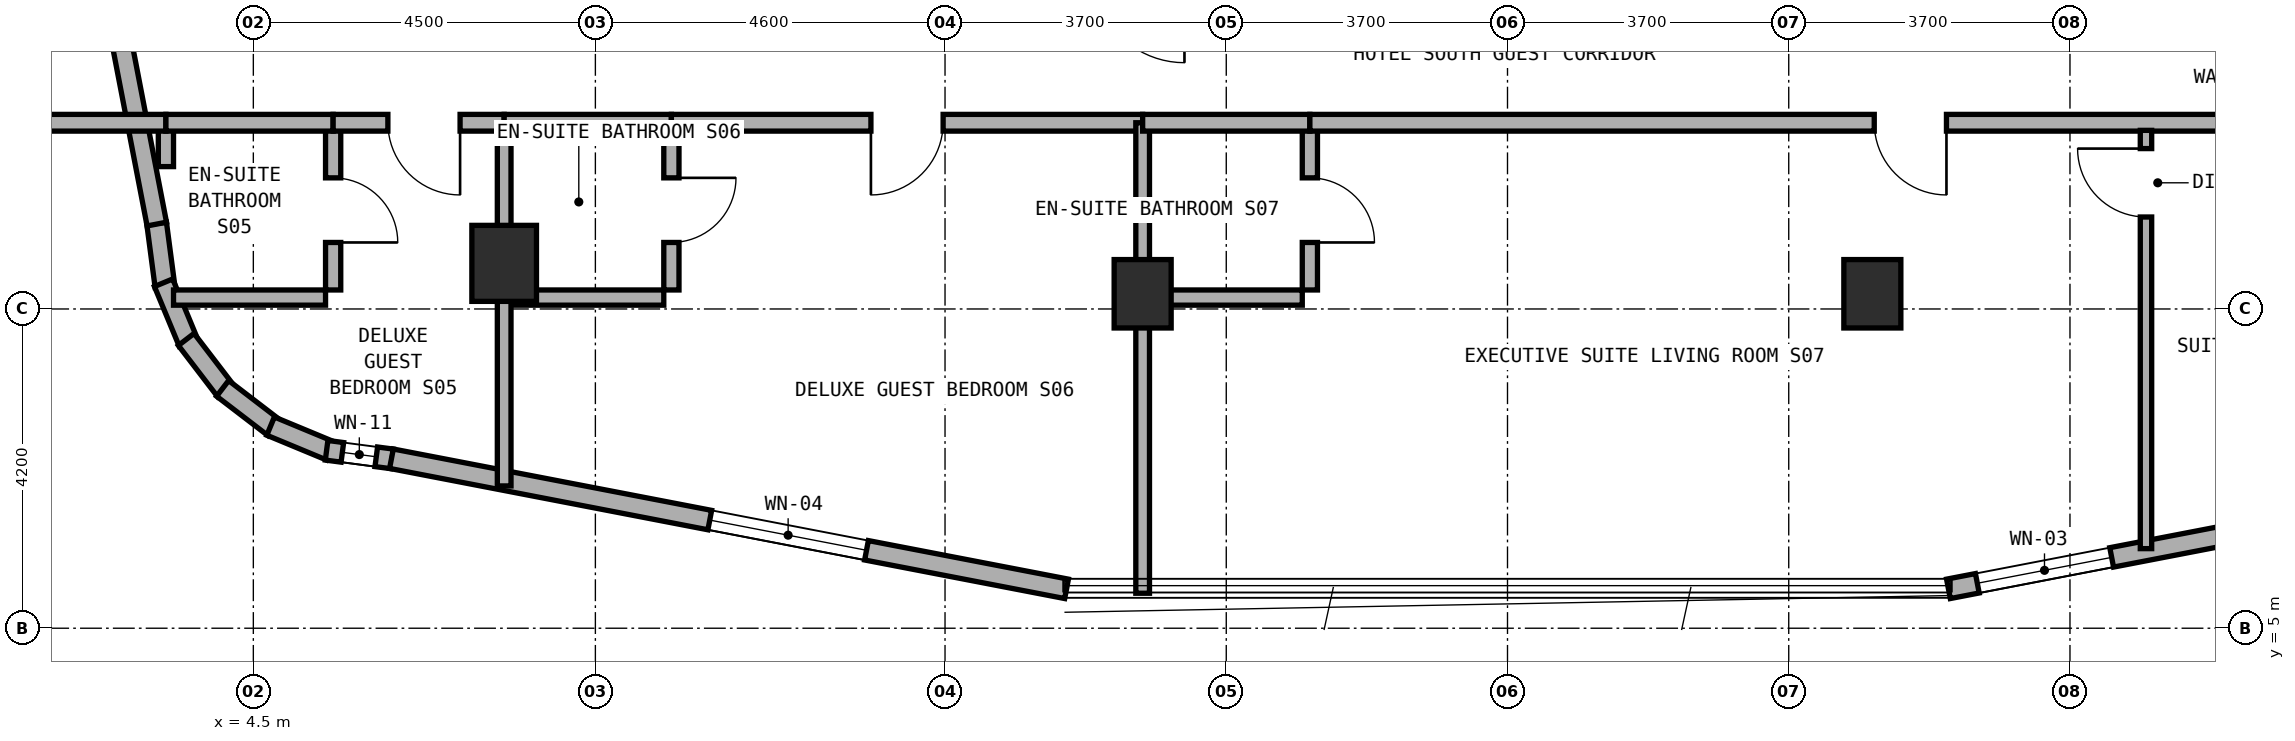
"""IFC4 building model, lengths in metres.
Left out: names, types, materials, properties, quantities, classifications, styles, units other than length and angle.
Written with IfcOpenShell. Run it as: python <this file> out.ifc"""

import sys

from ifc_helpers import new_model, si_unit, direction, frame, frame_2d, origin, origin_2d, place, context, subcontext, project, spatial, rectangle, extrude, element, fill, save


model = new_model("IFC4")
c1 = context("Model", 3, precision=1e-05, world=origin(), true_north=direction((0.0, 1.0)))
c2 = subcontext(c1, "Body", "Model", "MODEL_VIEW")
j1 = project(units=[si_unit("LENGTHUNIT", "METRE"), si_unit("PLANEANGLEUNIT", "RADIAN")], contexts=[c1])
p1 = place(None, origin())
s1 = spatial("IfcSite", under=j1, at=p1, CompositionType="ELEMENT")
p2 = place(p1, origin())
s2 = spatial("IfcBuilding", under=s1, at=p2, CompositionType="ELEMENT")
p3 = place(p2, frame((0.0, 0.0, 177.5)))
s3 = spatial("IfcBuildingStorey", under=s2, at=p3, CompositionType="ELEMENT", Elevation=177.5)
for number, where, z_axis, x_axis in (
    (1, (16.2, 9.4, 0.0), (0.0, 0.0, 1.0), (1.0, 0.0, 0.0)),
    (2, (25.8, 9.4, 0.0), (0.0, 0.0, 1.0), (1.0, 0.0, 0.0)),
):
    element("IfcColumn", number, at=place(p3, frame(where, z_axis=z_axis, x_axis=x_axis)), inside=s3, PredefinedType="COLUMN", context=c2, shape_type="SweptSolid", body=[
        extrude(rectangle(XDim=0.75, YDim=0.9, at=origin_2d()), origin(), (0.0, 0.0, 1.0), 3.6),
    ])
p4 = place(p3, frame((7.8, 9.8, 0.0), z_axis=(0.0, 0.0, 1.0), x_axis=(1.0, 0.0, 0.0)))
e3 = element("IfcColumn", 3, at=p4, inside=s3, PredefinedType="COLUMN", context=c2, shape_type="SweptSolid", body=[
    extrude(rectangle(XDim=0.85, YDim=1.0, at=origin_2d()), origin(), (0.0, 0.0, 1.0), 3.6),
])
p5 = place(p3, frame((3.228, 10.325, 0.0), z_axis=(0.0, 0.0, 1.0), x_axis=(0.130704676564, -0.99142134712, 0.0)))
e4 = element("IfcWall", 4, at=p5, inside=s3, PredefinedType="STANDARD", context=c2, shape_type="SweptSolid", body=[
    extrude(rectangle(XDim=0.833, YDim=0.26, at=frame_2d((0.417, 0.0))), origin(), (0.0, 0.0, 1.0), 3.32),
])
p6 = place(p3, frame((3.319, 9.545, 0.0), z_axis=(0.0, 0.0, 1.0), x_axis=(0.383086687796, -0.923712395518, 0.0)))
e5 = element("IfcWall", 5, at=p6, inside=s3, PredefinedType="STANDARD", context=c2, shape_type="SweptSolid", body=[
    extrude(rectangle(XDim=0.851, YDim=0.26, at=frame_2d((0.425, 0.0))), origin(), (0.0, 0.0, 1.0), 3.32),
])
for number, where, z_axis, x_axis in (
    (6, (3.617, 8.799, 0.0), (0.0, 0.0, 1.0), (0.608, -0.794, 0.0)),
    (7, (4.096, 8.155, 0.0), (0.0, 0.0, 1.0), (0.794, -0.608, 0.0)),
):
    element("IfcWall", number, at=place(p3, frame(where, z_axis=z_axis, x_axis=x_axis)), inside=s3, PredefinedType="STANDARD", context=c2, shape_type="SweptSolid", body=[
        extrude(rectangle(XDim=0.85, YDim=0.26, at=frame_2d((0.425, 0.0))), origin(), (0.0, 0.0, 1.0), 3.32),
    ])
p7 = place(p3, frame((4.727, 7.659, 0.0), z_axis=(0.0, 0.0, 1.0), x_axis=(0.923712395518, -0.383086687796, 0.0)))
e8 = element("IfcWall", 8, at=p7, inside=s3, PredefinedType="STANDARD", context=c2, shape_type="SweptSolid", body=[
    extrude(rectangle(XDim=0.851, YDim=0.26, at=frame_2d((0.425, 0.0))), origin(), (0.0, 0.0, 1.0), 3.32),
])
p8 = place(p3, frame((5.464, 7.341, 0.0), z_axis=(0.0, 0.0, 1.0), x_axis=(0.991488716273, -0.130192647656, 0.0)))
e9 = element("IfcWall", 9, at=p8, inside=s3, PredefinedType="STANDARD", context=c2, shape_type="SweptSolid", body=[
    extrude(rectangle(XDim=0.868, YDim=0.26, at=frame_2d((0.434, 0.0))), origin(), (0.0, 0.0, 1.0), 3.32),
])
p9 = place(p8, frame((0.209, 0.0, 0.85)))
e10 = element("IfcOpeningElement", 10, at=p9, cuts=e9, PredefinedType="OPENING", context=c2, shape_type="SweptSolid", body=[
    extrude(rectangle(XDim=0.45, YDim=1.5, at=frame_2d((0.225, 0.75))), frame((0.0, 0.14, 0.0), z_axis=(0.0, -1.0, 0.0), x_axis=(1.0, 0.0, 0.0)), (0.0, 0.0, 1.0), 0.28),
])
p10 = place(p3, frame((6.317, 7.23, 0.0), z_axis=(0.0, 0.0, 1.0), x_axis=(0.98192801022, -0.189254809039, 0.0)))
e11 = element("IfcWall", 11, at=p10, inside=s3, PredefinedType="STANDARD", context=c2, shape_type="SweptSolid", body=[
    extrude(rectangle(XDim=9.046, YDim=0.26, at=frame_2d((4.523, 0.0))), origin(), (0.0, 0.0, 1.0), 3.32),
])
p11 = place(p10, frame((4.265, 0.0, 0.85)))
e12 = element("IfcOpeningElement", 12, at=p11, cuts=e11, PredefinedType="OPENING", context=c2, shape_type="SweptSolid", body=[
    extrude(rectangle(XDim=2.1, YDim=1.5, at=frame_2d((1.05, 0.75))), frame((0.0, 0.14, 0.0), z_axis=(0.0, -1.0, 0.0), x_axis=(1.0, 0.0, 0.0)), (0.0, 0.0, 1.0), 0.28),
])
p12 = place(p3, frame((26.801, 5.518, 0.0), z_axis=(0.0, 0.0, 1.0), x_axis=(0.98192801022, 0.189254809039, 0.0)))
e13 = element("IfcWall", 13, at=p12, inside=s3, PredefinedType="STANDARD", context=c2, shape_type="SweptSolid", body=[
    extrude(rectangle(XDim=9.046, YDim=0.26, at=frame_2d((4.523, 0.0))), origin(), (0.0, 0.0, 1.0), 3.32),
])
p13 = place(p12, frame((0.387, 0.0, 0.85)))
e14 = element("IfcOpeningElement", 14, at=p13, cuts=e13, PredefinedType="OPENING", context=c2, shape_type="SweptSolid", body=[
    extrude(rectangle(XDim=1.8, YDim=1.5, at=frame_2d((0.9, 0.75))), frame((0.0, 0.14, 0.0), z_axis=(0.0, -1.0, 0.0), x_axis=(1.0, 0.0, 0.0)), (0.0, 0.0, 1.0), 0.28),
])
p14 = place(p12, frame((4.065, 0.0, 0.85)))
e15 = element("IfcOpeningElement", 15, at=p14, cuts=e13, PredefinedType="OPENING", context=c2, shape_type="SweptSolid", body=[
    extrude(rectangle(XDim=2.1, YDim=1.5, at=frame_2d((1.05, 0.75))), frame((0.0, 0.14, 0.0), z_axis=(0.0, -1.0, 0.0), x_axis=(1.0, 0.0, 0.0)), (0.0, 0.0, 1.0), 0.28),
])
p15 = place(p3, frame((1.518, 19.199, 0.0), z_axis=(0.0, 0.0, 1.0), x_axis=(0.189254809039, -0.98192801022, 0.0)))
e16 = element("IfcWall", 16, at=p15, inside=s3, PredefinedType="STANDARD", context=c2, shape_type="SweptSolid", body=[
    extrude(rectangle(XDim=9.046, YDim=0.26, at=frame_2d((4.523, 0.0))), origin(), (0.0, 0.0, 1.0), 3.32),
])
p16 = place(p15, frame((2.733, 0.0, 0.85)))
e17 = element("IfcOpeningElement", 17, at=p16, cuts=e16, PredefinedType="OPENING", context=c2, shape_type="SweptSolid", body=[
    extrude(rectangle(XDim=2.1, YDim=1.5, at=frame_2d((1.05, 0.75))), frame((0.0, 0.14, 0.0), z_axis=(0.0, -1.0, 0.0), x_axis=(1.0, 0.0, 0.0)), (0.0, 0.0, 1.0), 0.28),
])
p17 = place(p3, frame((5.55, 9.45, 0.0), z_axis=(0.0, 0.0, 1.0), x_axis=(0.0, 1.0, 0.0)))
e18 = element("IfcWall", 18, at=p17, inside=s3, PredefinedType="PLUMBINGWALL", context=c2, shape_type="SweptSolid", body=[
    extrude(rectangle(XDim=2.1, YDim=0.2, at=frame_2d((1.05, 0.0))), origin(), (0.0, 0.0, 1.0), 3.32),
])
p18 = place(p17, frame((0.625, 0.0, 0.0)))
e19 = element("IfcOpeningElement", 19, at=p18, cuts=e18, PredefinedType="OPENING", context=c2, shape_type="SweptSolid", body=[
    extrude(rectangle(XDim=0.85, YDim=2.1, at=frame_2d((0.425, 1.05))), frame((0.0, 0.11, 0.0), z_axis=(0.0, -1.0, 0.0), x_axis=(1.0, 0.0, 0.0)), (0.0, 0.0, 1.0), 0.22),
])
p19 = place(p3, frame((3.45, 9.35, 0.0), z_axis=(0.0, 0.0, 1.0), x_axis=(1.0, 0.0, 0.0)))
e20 = element("IfcWall", 20, at=p19, inside=s3, PredefinedType="PLUMBINGWALL", context=c2, shape_type="SweptSolid", body=[
    extrude(rectangle(XDim=2.0, YDim=0.2, at=frame_2d((1.0, 0.0))), origin(), (0.0, 0.0, 1.0), 3.32),
])
p20 = place(p3, frame((3.35, 11.073, 0.0), z_axis=(0.0, 0.0, 1.0), x_axis=(0.0, 1.0, 0.0)))
e21 = element("IfcWall", 21, at=p20, inside=s3, PredefinedType="PLUMBINGWALL", context=c2, shape_type="SweptSolid", body=[
    extrude(rectangle(XDim=0.577, YDim=0.2, at=frame_2d((0.289, 0.0))), origin(), (0.0, 0.0, 1.0), 3.32),
])
p21 = place(p3, frame((1.56, 11.65, 0.0), z_axis=(0.0, 0.0, 1.0), x_axis=(1.0, 0.0, 0.0)))
e22 = element("IfcWall", 22, at=p21, inside=s3, PredefinedType="SOLIDWALL", context=c2, shape_type="SweptSolid", body=[
    extrude(rectangle(XDim=1.79, YDim=0.22, at=frame_2d((0.895, 0.0))), origin(), (0.0, 0.0, 1.0), 3.32),
])
p22 = place(p3, frame((3.35, 11.65, 0.0), z_axis=(0.0, 0.0, 1.0), x_axis=(1.0, 0.0, 0.0)))
e23 = element("IfcWall", 23, at=p22, inside=s3, PredefinedType="SOLIDWALL", context=c2, shape_type="SweptSolid", body=[
    extrude(rectangle(XDim=2.2, YDim=0.22, at=frame_2d((1.1, 0.0))), origin(), (0.0, 0.0, 1.0), 3.32),
])
p23 = place(p3, frame((5.55, 11.65, 0.0), z_axis=(0.0, 0.0, 1.0), x_axis=(1.0, 0.0, 0.0)))
e24 = element("IfcWall", 24, at=p23, inside=s3, PredefinedType="SOLIDWALL", context=c2, shape_type="SweptSolid", body=[
    extrude(rectangle(XDim=2.25, YDim=0.22, at=frame_2d((1.125, 0.0))), origin(), (0.0, 0.0, 1.0), 2.995),
])
p24 = place(p23, frame((0.72, 0.0, 0.0)))
e25 = element("IfcOpeningElement", 25, at=p24, cuts=e24, PredefinedType="OPENING", context=c2, shape_type="SweptSolid", body=[
    extrude(rectangle(XDim=0.95, YDim=2.1, at=frame_2d((0.475, 1.05))), frame((0.0, 0.12, 0.0), z_axis=(0.0, -1.0, 0.0), x_axis=(1.0, 0.0, 0.0)), (0.0, 0.0, 1.0), 0.24),
])
p25 = place(p3, frame((7.8, 6.872, 0.0), z_axis=(0.0, 0.0, 1.0), x_axis=(0.0, 1.0, 0.0)))
e26 = element("IfcWall", 26, at=p25, inside=s3, PredefinedType="SOLIDWALL", context=c2, shape_type="SweptSolid", body=[
    extrude(rectangle(XDim=4.778, YDim=0.18, at=frame_2d((2.389, 0.0))), origin(), (0.0, 0.0, 1.0), 2.935),
])
p26 = place(p3, frame((10.0, 9.45, 0.0), z_axis=(0.0, 0.0, 1.0), x_axis=(0.0, 1.0, 0.0)))
e27 = element("IfcWall", 27, at=p26, inside=s3, PredefinedType="PLUMBINGWALL", context=c2, shape_type="SweptSolid", body=[
    extrude(rectangle(XDim=2.1, YDim=0.2, at=frame_2d((1.05, 0.0))), origin(), (0.0, 0.0, 1.0), 2.845),
])
p27 = place(p26, frame((0.625, 0.0, 0.0)))
e28 = element("IfcOpeningElement", 28, at=p27, cuts=e27, PredefinedType="OPENING", context=c2, shape_type="SweptSolid", body=[
    extrude(rectangle(XDim=0.85, YDim=2.1, at=frame_2d((0.425, 1.05))), frame((0.0, 0.11, 0.0), z_axis=(0.0, -1.0, 0.0), x_axis=(1.0, 0.0, 0.0)), (0.0, 0.0, 1.0), 0.22),
])
p28 = place(p3, frame((7.9, 9.35, 0.0), z_axis=(0.0, 0.0, 1.0), x_axis=(1.0, 0.0, 0.0)))
e29 = element("IfcWall", 29, at=p28, inside=s3, PredefinedType="PLUMBINGWALL", context=c2, shape_type="SweptSolid", body=[
    extrude(rectangle(XDim=2.0, YDim=0.2, at=frame_2d((1.0, 0.0))), origin(), (0.0, 0.0, 1.0), 3.32),
])
p29 = place(p3, frame((7.8, 11.65, 0.0), z_axis=(0.0, 0.0, 1.0), x_axis=(1.0, 0.0, 0.0)))
e30 = element("IfcWall", 30, at=p29, inside=s3, PredefinedType="SOLIDWALL", context=c2, shape_type="SweptSolid", body=[
    extrude(rectangle(XDim=2.2, YDim=0.22, at=frame_2d((1.1, 0.0))), origin(), (0.0, 0.0, 1.0), 2.995),
])
p30 = place(p3, frame((10.0, 11.65, 0.0), z_axis=(0.0, 0.0, 1.0), x_axis=(1.0, 0.0, 0.0)))
e31 = element("IfcWall", 31, at=p30, inside=s3, PredefinedType="SOLIDWALL", context=c2, shape_type="SweptSolid", body=[
    extrude(rectangle(XDim=6.2, YDim=0.22, at=frame_2d((3.1, 0.0))), origin(), (0.0, 0.0, 1.0), 2.995),
])
p31 = place(p30, frame((2.625, 0.0, 0.0)))
e32 = element("IfcOpeningElement", 32, at=p31, cuts=e31, PredefinedType="OPENING", context=c2, shape_type="SweptSolid", body=[
    extrude(rectangle(XDim=0.95, YDim=2.1, at=frame_2d((0.475, 1.05))), frame((0.0, 0.12, 0.0), z_axis=(0.0, -1.0, 0.0), x_axis=(1.0, 0.0, 0.0)), (0.0, 0.0, 1.0), 0.24),
])
p32 = place(p3, frame((16.2, 5.46, 0.0), z_axis=(0.0, 0.0, 1.0), x_axis=(0.0, 1.0, 0.0)))
e33 = element("IfcWall", 33, at=p32, inside=s3, PredefinedType="SOLIDWALL", context=c2, shape_type="SweptSolid", body=[
    extrude(rectangle(XDim=6.19, YDim=0.18, at=frame_2d((3.095, 0.0))), origin(), (0.0, 0.0, 1.0), 2.935),
])
p33 = place(p3, frame((18.4, 9.45, 0.0), z_axis=(0.0, 0.0, 1.0), x_axis=(0.0, 1.0, 0.0)))
e34 = element("IfcWall", 34, at=p33, inside=s3, PredefinedType="PLUMBINGWALL", context=c2, shape_type="SweptSolid", body=[
    extrude(rectangle(XDim=2.1, YDim=0.2, at=frame_2d((1.05, 0.0))), origin(), (0.0, 0.0, 1.0), 2.845),
])
p34 = place(p33, frame((0.625, 0.0, 0.0)))
e35 = element("IfcOpeningElement", 35, at=p34, cuts=e34, PredefinedType="OPENING", context=c2, shape_type="SweptSolid", body=[
    extrude(rectangle(XDim=0.85, YDim=2.1, at=frame_2d((0.425, 1.05))), frame((0.0, 0.11, 0.0), z_axis=(0.0, -1.0, 0.0), x_axis=(1.0, 0.0, 0.0)), (0.0, 0.0, 1.0), 0.22),
])
p35 = place(p3, frame((16.3, 9.35, 0.0), z_axis=(0.0, 0.0, 1.0), x_axis=(1.0, 0.0, 0.0)))
e36 = element("IfcWall", 36, at=p35, inside=s3, PredefinedType="PLUMBINGWALL", context=c2, shape_type="SweptSolid", body=[
    extrude(rectangle(XDim=2.0, YDim=0.2, at=frame_2d((1.0, 0.0))), origin(), (0.0, 0.0, 1.0), 2.935),
])
p36 = place(p3, frame((16.2, 11.65, 0.0), z_axis=(0.0, 0.0, 1.0), x_axis=(1.0, 0.0, 0.0)))
e37 = element("IfcWall", 37, at=p36, inside=s3, PredefinedType="SOLIDWALL", context=c2, shape_type="SweptSolid", body=[
    extrude(rectangle(XDim=2.2, YDim=0.22, at=frame_2d((1.1, 0.0))), origin(), (0.0, 0.0, 1.0), 2.995),
])
p37 = place(p3, frame((18.4, 11.65, 0.0), z_axis=(0.0, 0.0, 1.0), x_axis=(1.0, 0.0, 0.0)))
e38 = element("IfcWall", 38, at=p37, inside=s3, PredefinedType="SOLIDWALL", context=c2, shape_type="SweptSolid", body=[
    extrude(rectangle(XDim=15.8, YDim=0.22, at=frame_2d((7.9, 0.0))), origin(), (0.0, 0.0, 1.0), 2.995),
])
p38 = place(p37, frame((7.425, 0.0, 0.0)))
e39 = element("IfcOpeningElement", 39, at=p38, cuts=e38, PredefinedType="OPENING", context=c2, shape_type="SweptSolid", body=[
    extrude(rectangle(XDim=0.95, YDim=2.1, at=frame_2d((0.475, 1.05))), frame((0.0, 0.12, 0.0), z_axis=(0.0, -1.0, 0.0), x_axis=(1.0, 0.0, 0.0)), (0.0, 0.0, 1.0), 0.24),
])
p39 = place(p3, frame((29.4, 6.047, 0.0), z_axis=(0.0, 0.0, 1.0), x_axis=(0.0, 1.0, 0.0)))
e40 = element("IfcWall", 40, at=p39, inside=s3, PredefinedType="PARTITIONING", context=c2, shape_type="SweptSolid", body=[
    extrude(rectangle(XDim=5.503, YDim=0.15, at=frame_2d((2.751, 0.0))), origin(), (0.0, 0.0, 1.0), 2.845),
])
p40 = place(p39, frame((4.363, 0.0, 0.0)))
e41 = element("IfcOpeningElement", 41, at=p40, cuts=e40, PredefinedType="OPENING", context=c2, shape_type="SweptSolid", body=[
    extrude(rectangle(XDim=0.9, YDim=2.1, at=frame_2d((0.45, 1.05))), frame((0.0, 0.085, 0.0), z_axis=(0.0, -1.0, 0.0), x_axis=(1.0, 0.0, 0.0)), (0.0, 0.0, 1.0), 0.17),
])
p41 = place(p11, origin())
e42 = element("IfcWindow", 42, at=p41, inside=s3, PartitioningType="SINGLE_PANEL", PredefinedType="WINDOW", context=c2, shape_type="SweptSolid", body=[
    extrude(rectangle(XDim=2.1, YDim=1.5, at=frame_2d((1.05, 0.75))), frame((0.0, 0.03, 0.0), z_axis=(0.0, -1.0, 0.0), x_axis=(1.0, 0.0, 0.0)), (0.0, 0.0, 1.0), 0.06),
])
fill(e12, e42)
p42 = place(p13, origin())
e43 = element("IfcWindow", 43, at=p42, inside=s3, PartitioningType="SINGLE_PANEL", PredefinedType="WINDOW", context=c2, shape_type="SweptSolid", body=[
    extrude(rectangle(XDim=1.8, YDim=1.5, at=frame_2d((0.9, 0.75))), frame((0.0, 0.03, 0.0), z_axis=(0.0, -1.0, 0.0), x_axis=(1.0, 0.0, 0.0)), (0.0, 0.0, 1.0), 0.06),
])
fill(e14, e43)
p43 = place(p9, origin())
e44 = element("IfcWindow", 44, at=p43, inside=s3, PartitioningType="SINGLE_PANEL", PredefinedType="WINDOW", context=c2, shape_type="SweptSolid", body=[
    extrude(rectangle(XDim=0.45, YDim=1.5, at=frame_2d((0.225, 0.75))), frame((0.0, 0.03, 0.0), z_axis=(0.0, -1.0, 0.0), x_axis=(1.0, 0.0, 0.0)), (0.0, 0.0, 1.0), 0.06),
])
fill(e10, e44)
p44 = place(p18, frame((0.85, 0.0, 0.0), z_axis=(0.0, 0.0, 1.0), x_axis=(-1.0, 0.0, 0.0)))
e45 = element("IfcDoor", 45, at=p44, inside=s3, OperationType="SINGLE_SWING_RIGHT", PredefinedType="DOOR", context=c2, shape_type="SweptSolid", body=[
    extrude(rectangle(XDim=0.85, YDim=2.1, at=frame_2d((0.425, 1.05))), frame((0.0, 0.025, 0.0), z_axis=(0.0, -1.0, 0.0), x_axis=(1.0, 0.0, 0.0)), (0.0, 0.0, 1.0), 0.05),
])
fill(e19, e45)
p45 = place(p24, frame((0.95, 0.0, 0.0), z_axis=(0.0, 0.0, 1.0), x_axis=(-1.0, 0.0, 0.0)))
e46 = element("IfcDoor", 46, at=p45, inside=s3, OperationType="SINGLE_SWING_LEFT", PredefinedType="DOOR", context=c2, shape_type="SweptSolid", body=[
    extrude(rectangle(XDim=0.95, YDim=2.1, at=frame_2d((0.475, 1.05))), frame((0.0, 0.025, 0.0), z_axis=(0.0, -1.0, 0.0), x_axis=(1.0, 0.0, 0.0)), (0.0, 0.0, 1.0), 0.05),
])
fill(e25, e46)
p46 = place(p27, frame((0.85, 0.0, 0.0), z_axis=(0.0, 0.0, 1.0), x_axis=(-1.0, 0.0, 0.0)))
e47 = element("IfcDoor", 47, at=p46, inside=s3, OperationType="SINGLE_SWING_LEFT", PredefinedType="DOOR", context=c2, shape_type="SweptSolid", body=[
    extrude(rectangle(XDim=0.85, YDim=2.1, at=frame_2d((0.425, 1.05))), frame((0.0, 0.025, 0.0), z_axis=(0.0, -1.0, 0.0), x_axis=(1.0, 0.0, 0.0)), (0.0, 0.0, 1.0), 0.05),
])
fill(e28, e47)
p47 = place(p31, frame((0.95, 0.0, 0.0), z_axis=(0.0, 0.0, 1.0), x_axis=(-1.0, 0.0, 0.0)))
e48 = element("IfcDoor", 48, at=p47, inside=s3, OperationType="SINGLE_SWING_RIGHT", PredefinedType="DOOR", context=c2, shape_type="SweptSolid", body=[
    extrude(rectangle(XDim=0.95, YDim=2.1, at=frame_2d((0.475, 1.05))), frame((0.0, 0.025, 0.0), z_axis=(0.0, -1.0, 0.0), x_axis=(1.0, 0.0, 0.0)), (0.0, 0.0, 1.0), 0.05),
])
fill(e32, e48)
p48 = place(p34, frame((0.85, 0.0, 0.0), z_axis=(0.0, 0.0, 1.0), x_axis=(-1.0, 0.0, 0.0)))
e49 = element("IfcDoor", 49, at=p48, inside=s3, OperationType="SINGLE_SWING_RIGHT", PredefinedType="DOOR", context=c2, shape_type="SweptSolid", body=[
    extrude(rectangle(XDim=0.85, YDim=2.1, at=frame_2d((0.425, 1.05))), frame((0.0, 0.025, 0.0), z_axis=(0.0, -1.0, 0.0), x_axis=(1.0, 0.0, 0.0)), (0.0, 0.0, 1.0), 0.05),
])
fill(e35, e49)
p49 = place(p38, frame((0.95, 0.0, 0.0), z_axis=(0.0, 0.0, 1.0), x_axis=(-1.0, 0.0, 0.0)))
e50 = element("IfcDoor", 50, at=p49, inside=s3, OperationType="SINGLE_SWING_LEFT", PredefinedType="DOOR", context=c2, shape_type="SweptSolid", body=[
    extrude(rectangle(XDim=0.95, YDim=2.1, at=frame_2d((0.475, 1.05))), frame((0.0, 0.025, 0.0), z_axis=(0.0, -1.0, 0.0), x_axis=(1.0, 0.0, 0.0)), (0.0, 0.0, 1.0), 0.05),
])
fill(e39, e50)
p50 = place(p40, origin())
e51 = element("IfcDoor", 51, at=p50, inside=s3, OperationType="SINGLE_SWING_RIGHT", PredefinedType="DOOR", context=c2, shape_type="SweptSolid", body=[
    extrude(rectangle(XDim=0.9, YDim=2.1, at=frame_2d((0.45, 1.05))), frame((0.0, 0.025, 0.0), z_axis=(0.0, -1.0, 0.0), x_axis=(1.0, 0.0, 0.0)), (0.0, 0.0, 1.0), 0.05),
])
fill(e41, e51)
save(model, sys.argv[1])
